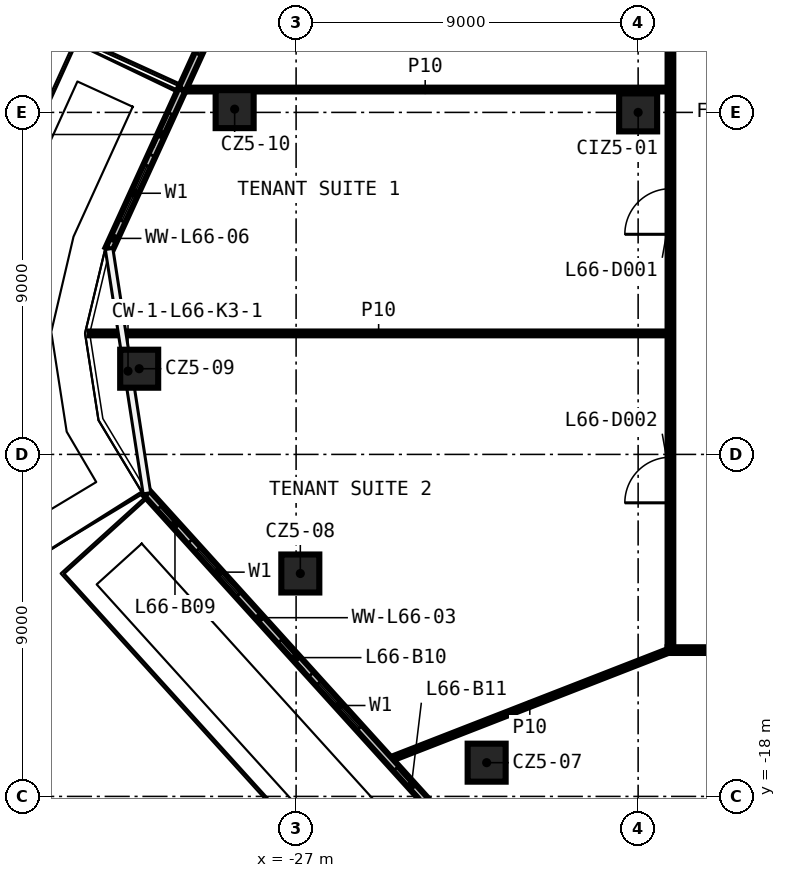
"""IFC4 building model, lengths in metres.
Left out: names, types, materials, properties, quantities, classifications, styles, units other than length and angle.
Written with IfcOpenShell. Run it as: python <this file> out.ifc"""

import sys

from ifc_helpers import new_model, si_unit, direction, frame, frame_2d, origin, origin_2d, place, context, subcontext, project, spatial, rectangle, extrude, element, fill, save


model = new_model("IFC4")
c1 = context("Model", 3, precision=1e-05, world=origin(), true_north=direction((0.0, 1.0)))
c2 = subcontext(c1, "Body", "Model", "MODEL_VIEW")
j1 = project(units=[si_unit("LENGTHUNIT", "METRE"), si_unit("PLANEANGLEUNIT", "RADIAN")], contexts=[c1])
p1 = place(None, origin())
s1 = spatial("IfcSite", under=j1, at=p1, CompositionType="ELEMENT")
p2 = place(p1, origin())
s2 = spatial("IfcBuilding", under=s1, at=p2, CompositionType="ELEMENT")
p3 = place(p2, frame((0.0, 0.0, 311.0)))
s3 = spatial("IfcBuildingStorey", under=s2, at=p3, CompositionType="ELEMENT", Elevation=311.0)
for number, where, z_axis, x_axis in (
    (1, (-21.986, -17.112, 0.0), (0.0, 0.0, 1.0), (1.0, 0.0, 0.0)),
    (2, (-26.889, -12.134, 0.0), (0.0, 0.0, 1.0), (1.0, 0.0, 0.0)),
    (3, (-31.129, -6.745, 0.0), (0.0, 0.0, 1.0), (1.0, 0.0, 0.0)),
    (4, (-28.617, 0.086, 0.0), (0.0, 0.0, 1.0), (1.0, 0.0, 0.0)),
    (5, (-18.0, 0.0, 0.0), (0.0, 0.0, 1.0), (1.0, 0.0, 0.0)),
):
    element("IfcColumn", number, at=place(p3, frame(where, z_axis=z_axis, x_axis=x_axis)), inside=s3, PredefinedType="COLUMN", context=c2, shape_type="SweptSolid", body=[
        extrude(rectangle(XDim=1.0, YDim=1.0, at=origin_2d()), origin(), (0.0, 0.0, 1.0), 3.82),
    ])
p4 = place(p3, frame((17.225, -14.15, 0.0), z_axis=(0.0, 0.0, 1.0), x_axis=(-1.0, 0.0, 0.0)))
e6 = element("IfcWall", 6, at=p4, inside=s3, PredefinedType="PARTITIONING", context=c2, shape_type="SweptSolid", body=[
    extrude(rectangle(XDim=34.45, YDim=0.15, at=frame_2d((17.225, 0.0))), origin(), (0.0, 0.0, 1.0), 3.82),
])
p5 = place(p4, frame((31.269, 0.0, 0.0)))
e7 = element("IfcOpeningElement", 7, at=p5, cuts=e6, PredefinedType="OPENING", context=c2, shape_type="SweptSolid", body=[
    extrude(rectangle(XDim=1.2, YDim=2.1, at=frame_2d((0.6, 1.05))), frame((0.0, 0.085, 0.0), z_axis=(0.0, -1.0, 0.0), x_axis=(1.0, 0.0, 0.0)), (0.0, 0.0, 1.0), 0.17),
])
p6 = place(p4, frame((24.719, 0.0, 0.0)))
e8 = element("IfcOpeningElement", 8, at=p6, cuts=e6, PredefinedType="OPENING", context=c2, shape_type="SweptSolid", body=[
    extrude(rectangle(XDim=1.2, YDim=2.1, at=frame_2d((0.6, 1.05))), frame((0.0, 0.085, 0.0), z_axis=(0.0, -1.0, 0.0), x_axis=(1.0, 0.0, 0.0)), (0.0, 0.0, 1.0), 0.17),
])
p7 = place(p4, frame((20.044, 0.0, 0.0)))
e9 = element("IfcOpeningElement", 9, at=p7, cuts=e6, PredefinedType="OPENING", context=c2, shape_type="SweptSolid", body=[
    extrude(rectangle(XDim=1.2, YDim=2.1, at=frame_2d((0.6, 1.05))), frame((0.0, 0.085, 0.0), z_axis=(0.0, -1.0, 0.0), x_axis=(1.0, 0.0, 0.0)), (0.0, 0.0, 1.0), 0.17),
])
p8 = place(p4, frame((15.364, 0.0, 0.0)))
e10 = element("IfcOpeningElement", 10, at=p8, cuts=e6, PredefinedType="OPENING", context=c2, shape_type="SweptSolid", body=[
    extrude(rectangle(XDim=1.2, YDim=2.1, at=frame_2d((0.6, 1.05))), frame((0.0, 0.085, 0.0), z_axis=(0.0, -1.0, 0.0), x_axis=(1.0, 0.0, 0.0)), (0.0, 0.0, 1.0), 0.17),
])
p9 = place(p4, frame((10.685, 0.0, 0.0)))
e11 = element("IfcOpeningElement", 11, at=p9, cuts=e6, PredefinedType="OPENING", context=c2, shape_type="SweptSolid", body=[
    extrude(rectangle(XDim=1.2, YDim=2.1, at=frame_2d((0.6, 1.05))), frame((0.0, 0.085, 0.0), z_axis=(0.0, -1.0, 0.0), x_axis=(1.0, 0.0, 0.0)), (0.0, 0.0, 1.0), 0.17),
])
p10 = place(p4, frame((4.107, 0.0, 0.0)))
e12 = element("IfcOpeningElement", 12, at=p10, cuts=e6, PredefinedType="OPENING", context=c2, shape_type="SweptSolid", body=[
    extrude(rectangle(XDim=1.2, YDim=2.1, at=frame_2d((0.6, 1.05))), frame((0.0, 0.085, 0.0), z_axis=(0.0, -1.0, 0.0), x_axis=(1.0, 0.0, 0.0)), (0.0, 0.0, 1.0), 0.17),
])
p11 = place(p3, frame((-32.431, -5.816, 0.0), z_axis=(0.0, 0.0, 1.0), x_axis=(1.0, 0.0, 0.0)))
e13 = element("IfcWall", 13, at=p11, inside=s3, PredefinedType="PARTITIONING", context=c2, shape_type="SweptSolid", body=[
    extrude(rectangle(XDim=15.206, YDim=0.1, at=frame_2d((7.603, 0.0))), origin(), (0.0, 0.0, 1.0), 3.82),
])
p12 = place(p3, frame((-29.981, 0.601, 0.0), z_axis=(0.0, 0.0, 1.0), x_axis=(1.0, 0.0, 0.0)))
e14 = element("IfcWall", 14, at=p12, inside=s3, PredefinedType="PARTITIONING", context=c2, shape_type="SweptSolid", body=[
    extrude(rectangle(XDim=12.756, YDim=0.1, at=frame_2d((6.378, 0.0))), origin(), (0.0, 0.0, 1.0), 3.82),
])
p13 = place(p3, frame((-24.55, -17.033, 0.0), z_axis=(0.0, 0.0, 1.0), x_axis=(0.931751191714, 0.363097392911, 0.0)))
e15 = element("IfcWall", 15, at=p13, inside=s3, PredefinedType="PARTITIONING", context=c2, shape_type="SweptSolid", body=[
    extrude(rectangle(XDim=7.942, YDim=0.1, at=frame_2d((3.971, 0.0))), origin(), (0.0, 0.0, 1.0), 3.82),
])
p14 = place(p3, frame((-17.15, -14.075, 0.0), z_axis=(0.0, 0.0, 1.0), x_axis=(0.0, 1.0, 0.0)))
e16 = element("IfcWall", 16, at=p14, inside=s3, PredefinedType="PARTITIONING", context=c2, shape_type="SweptSolid", body=[
    extrude(rectangle(XDim=28.15, YDim=0.15, at=frame_2d((14.075, 0.0))), origin(), (0.0, 0.0, 1.0), 3.82),
])
p15 = place(p14, frame((10.867, 0.0, 0.0)))
e17 = element("IfcOpeningElement", 17, at=p15, cuts=e16, PredefinedType="OPENING", context=c2, shape_type="SweptSolid", body=[
    extrude(rectangle(XDim=1.2, YDim=2.1, at=frame_2d((0.6, 1.05))), frame((0.0, 0.085, 0.0), z_axis=(0.0, -1.0, 0.0), x_axis=(1.0, 0.0, 0.0)), (0.0, 0.0, 1.0), 0.17),
])
p16 = place(p14, frame((3.801, 0.0, 0.0)))
e18 = element("IfcOpeningElement", 18, at=p16, cuts=e16, PredefinedType="OPENING", context=c2, shape_type="SweptSolid", body=[
    extrude(rectangle(XDim=1.2, YDim=2.1, at=frame_2d((0.6, 1.05))), frame((0.0, 0.085, 0.0), z_axis=(0.0, -1.0, 0.0), x_axis=(1.0, 0.0, 0.0)), (0.0, 0.0, 1.0), 0.17),
])
p17 = place(p14, frame((18.279, 0.0, 0.0)))
e19 = element("IfcOpeningElement", 19, at=p17, cuts=e16, PredefinedType="OPENING", context=c2, shape_type="SweptSolid", body=[
    extrude(rectangle(XDim=1.2, YDim=2.1, at=frame_2d((0.6, 1.05))), frame((0.0, 0.085, 0.0), z_axis=(0.0, -1.0, 0.0), x_axis=(1.0, 0.0, 0.0)), (0.0, 0.0, 1.0), 0.17),
])
p18 = place(p3, frame((-22.318, 17.414, 0.0), z_axis=(0.0, 0.0, 1.0), x_axis=(-0.415710447513, -0.909497016943, 0.0)))
e20 = element("IfcWall", 20, at=p18, inside=s3, PredefinedType="SOLIDWALL", context=c2, shape_type="SweptSolid", body=[
    extrude(rectangle(XDim=18.487, YDim=0.2, at=frame_2d((9.243, 0.0))), origin(), (0.0, 0.0, 1.0), 3.82),
])
p19 = place(p18, frame((2.0, 0.0, 0.6)))
e21 = element("IfcOpeningElement", 21, at=p19, cuts=e20, PredefinedType="OPENING", context=c2, shape_type="SweptSolid", body=[
    extrude(rectangle(XDim=1.6, YDim=2.4, at=frame_2d((0.8, 1.2))), frame((0.0, 0.11, 0.0), z_axis=(0.0, -1.0, 0.0), x_axis=(1.0, 0.0, 0.0)), (0.0, 0.0, 1.0), 0.22),
])
p20 = place(p18, frame((0.5, 0.0, 0.0)))
e22 = element("IfcOpeningElement", 22, at=p20, cuts=e20, PredefinedType="OPENING", context=c2, shape_type="SweptSolid", body=[
    extrude(rectangle(XDim=1.2, YDim=2.4, at=frame_2d((0.6, 1.2))), frame((0.0, 0.11, 0.0), z_axis=(0.0, -1.0, 0.0), x_axis=(1.0, 0.0, 0.0)), (0.0, 0.0, 1.0), 0.22),
])
p21 = place(p18, frame((6.622, 0.0, 0.6)))
e23 = element("IfcOpeningElement", 23, at=p21, cuts=e20, PredefinedType="OPENING", context=c2, shape_type="SweptSolid", body=[
    extrude(rectangle(XDim=1.6, YDim=2.4, at=frame_2d((0.8, 1.2))), frame((0.0, 0.11, 0.0), z_axis=(0.0, -1.0, 0.0), x_axis=(1.0, 0.0, 0.0)), (0.0, 0.0, 1.0), 0.22),
])
p22 = place(p18, frame((5.122, 0.0, 0.0)))
e24 = element("IfcOpeningElement", 24, at=p22, cuts=e20, PredefinedType="OPENING", context=c2, shape_type="SweptSolid", body=[
    extrude(rectangle(XDim=1.2, YDim=2.4, at=frame_2d((0.6, 1.2))), frame((0.0, 0.11, 0.0), z_axis=(0.0, -1.0, 0.0), x_axis=(1.0, 0.0, 0.0)), (0.0, 0.0, 1.0), 0.22),
])
p23 = place(p18, frame((9.743, 0.0, 0.6)))
e25 = element("IfcOpeningElement", 25, at=p23, cuts=e20, PredefinedType="OPENING", context=c2, shape_type="SweptSolid", body=[
    extrude(rectangle(XDim=1.6, YDim=2.4, at=frame_2d((0.8, 1.2))), frame((0.0, 0.11, 0.0), z_axis=(0.0, -1.0, 0.0), x_axis=(1.0, 0.0, 0.0)), (0.0, 0.0, 1.0), 0.22),
])
p24 = place(p18, frame((11.643, 0.0, 0.0)))
e26 = element("IfcOpeningElement", 26, at=p24, cuts=e20, PredefinedType="OPENING", context=c2, shape_type="SweptSolid", body=[
    extrude(rectangle(XDim=1.2, YDim=2.4, at=frame_2d((0.6, 1.2))), frame((0.0, 0.11, 0.0), z_axis=(0.0, -1.0, 0.0), x_axis=(1.0, 0.0, 0.0)), (0.0, 0.0, 1.0), 0.22),
])
p25 = place(p18, frame((15.865, 0.0, 0.6)))
e27 = element("IfcOpeningElement", 27, at=p25, cuts=e20, PredefinedType="OPENING", context=c2, shape_type="SweptSolid", body=[
    extrude(rectangle(XDim=1.6, YDim=2.4, at=frame_2d((0.8, 1.2))), frame((0.0, 0.11, 0.0), z_axis=(0.0, -1.0, 0.0), x_axis=(1.0, 0.0, 0.0)), (0.0, 0.0, 1.0), 0.22),
])
p26 = place(p18, frame((14.365, 0.0, 0.0)))
e28 = element("IfcOpeningElement", 28, at=p26, cuts=e20, PredefinedType="OPENING", context=c2, shape_type="SweptSolid", body=[
    extrude(rectangle(XDim=1.2, YDim=2.4, at=frame_2d((0.6, 1.2))), frame((0.0, 0.11, 0.0), z_axis=(0.0, -1.0, 0.0), x_axis=(1.0, 0.0, 0.0)), (0.0, 0.0, 1.0), 0.22),
])
p27 = place(p3, frame((-30.003, 0.601, 0.0), z_axis=(0.0, 0.0, 1.0), x_axis=(-0.415728482872, -0.909488773174, 0.0)))
e29 = element("IfcWall", 29, at=p27, inside=s3, PredefinedType="SOLIDWALL", context=c2, shape_type="SweptSolid", body=[
    extrude(rectangle(XDim=4.612, YDim=0.2, at=frame_2d((2.306, 0.0))), origin(), (0.0, 0.0, 1.0), 3.82),
])
p28 = place(p27, frame((2.2, 0.0, 0.6)))
e30 = element("IfcOpeningElement", 30, at=p28, cuts=e29, PredefinedType="OPENING", context=c2, shape_type="SweptSolid", body=[
    extrude(rectangle(XDim=1.6, YDim=2.4, at=frame_2d((0.8, 1.2))), frame((0.0, 0.11, 0.0), z_axis=(0.0, -1.0, 0.0), x_axis=(1.0, 0.0, 0.0)), (0.0, 0.0, 1.0), 0.22),
])
p29 = place(p27, frame((0.7, 0.0, 0.0)))
e31 = element("IfcOpeningElement", 31, at=p29, cuts=e29, PredefinedType="OPENING", context=c2, shape_type="SweptSolid", body=[
    extrude(rectangle(XDim=1.2, YDim=2.4, at=frame_2d((0.6, 1.2))), frame((0.0, 0.11, 0.0), z_axis=(0.0, -1.0, 0.0), x_axis=(1.0, 0.0, 0.0)), (0.0, 0.0, 1.0), 0.22),
])
p30 = place(p3, frame((-30.926, -10.023, 0.0), z_axis=(0.0, 0.0, 1.0), x_axis=(0.671222052588, -0.74125633631, 0.0)))
e32 = element("IfcWall", 32, at=p30, inside=s3, PredefinedType="SOLIDWALL", context=c2, shape_type="SweptSolid", body=[
    extrude(rectangle(XDim=14.202, YDim=0.2, at=frame_2d((7.101, 0.0))), origin(), (0.0, 0.0, 1.0), 3.82),
])
p31 = place(p30, frame((2.0, 0.0, 0.6)))
e33 = element("IfcOpeningElement", 33, at=p31, cuts=e32, PredefinedType="OPENING", context=c2, shape_type="SweptSolid", body=[
    extrude(rectangle(XDim=1.6, YDim=2.4, at=frame_2d((0.8, 1.2))), frame((0.0, 0.11, 0.0), z_axis=(0.0, -1.0, 0.0), x_axis=(1.0, 0.0, 0.0)), (0.0, 0.0, 1.0), 0.22),
])
p32 = place(p30, frame((0.5, 0.0, 0.0)))
e34 = element("IfcOpeningElement", 34, at=p32, cuts=e32, PredefinedType="OPENING", context=c2, shape_type="SweptSolid", body=[
    extrude(rectangle(XDim=1.2, YDim=2.4, at=frame_2d((0.6, 1.2))), frame((0.0, 0.11, 0.0), z_axis=(0.0, -1.0, 0.0), x_axis=(1.0, 0.0, 0.0)), (0.0, 0.0, 1.0), 0.22),
])
p33 = place(p30, frame((6.734, 0.0, 0.6)))
e35 = element("IfcOpeningElement", 35, at=p33, cuts=e32, PredefinedType="OPENING", context=c2, shape_type="SweptSolid", body=[
    extrude(rectangle(XDim=1.6, YDim=2.4, at=frame_2d((0.8, 1.2))), frame((0.0, 0.11, 0.0), z_axis=(0.0, -1.0, 0.0), x_axis=(1.0, 0.0, 0.0)), (0.0, 0.0, 1.0), 0.22),
])
p34 = place(p30, frame((5.234, 0.0, 0.0)))
e36 = element("IfcOpeningElement", 36, at=p34, cuts=e32, PredefinedType="OPENING", context=c2, shape_type="SweptSolid", body=[
    extrude(rectangle(XDim=1.2, YDim=2.4, at=frame_2d((0.6, 1.2))), frame((0.0, 0.11, 0.0), z_axis=(0.0, -1.0, 0.0), x_axis=(1.0, 0.0, 0.0)), (0.0, 0.0, 1.0), 0.22),
])
p35 = place(p30, frame((11.468, 0.0, 0.6)))
e37 = element("IfcOpeningElement", 37, at=p35, cuts=e32, PredefinedType="OPENING", context=c2, shape_type="SweptSolid", body=[
    extrude(rectangle(XDim=1.6, YDim=2.4, at=frame_2d((0.8, 1.2))), frame((0.0, 0.11, 0.0), z_axis=(0.0, -1.0, 0.0), x_axis=(1.0, 0.0, 0.0)), (0.0, 0.0, 1.0), 0.22),
])
p36 = place(p30, frame((9.768, 0.0, 0.0)))
e38 = element("IfcOpeningElement", 38, at=p36, cuts=e32, PredefinedType="OPENING", context=c2, shape_type="SweptSolid", body=[
    extrude(rectangle(XDim=1.2, YDim=2.4, at=frame_2d((0.6, 1.2))), frame((0.0, 0.11, 0.0), z_axis=(0.0, -1.0, 0.0), x_axis=(1.0, 0.0, 0.0)), (0.0, 0.0, 1.0), 0.22),
])
p37 = place(p15, origin())
e39 = element("IfcDoor", 39, at=p37, inside=s3, OperationType="SINGLE_SWING_RIGHT", PredefinedType="DOOR", context=c2, shape_type="SweptSolid", body=[
    extrude(rectangle(XDim=1.2, YDim=2.1, at=frame_2d((0.6, 1.05))), frame((0.0, 0.025, 0.0), z_axis=(0.0, -1.0, 0.0), x_axis=(1.0, 0.0, 0.0)), (0.0, 0.0, 1.0), 0.05),
])
fill(e17, e39)
p38 = place(p16, origin())
e40 = element("IfcDoor", 40, at=p38, inside=s3, OperationType="SINGLE_SWING_LEFT", PredefinedType="DOOR", context=c2, shape_type="SweptSolid", body=[
    extrude(rectangle(XDim=1.2, YDim=2.1, at=frame_2d((0.6, 1.05))), frame((0.0, 0.025, 0.0), z_axis=(0.0, -1.0, 0.0), x_axis=(1.0, 0.0, 0.0)), (0.0, 0.0, 1.0), 0.05),
])
fill(e18, e40)
p39 = place(p25, origin())
e41 = element("IfcWindow", 41, at=p39, inside=s3, PartitioningType="SINGLE_PANEL", PredefinedType="WINDOW", context=c2, shape_type="SweptSolid", body=[
    extrude(rectangle(XDim=1.6, YDim=2.4, at=frame_2d((0.8, 1.2))), frame((0.0, 0.03, 0.0), z_axis=(0.0, -1.0, 0.0), x_axis=(1.0, 0.0, 0.0)), (0.0, 0.0, 1.0), 0.06),
])
fill(e27, e41)
p40 = place(p28, origin())
e42 = element("IfcWindow", 42, at=p40, inside=s3, PartitioningType="SINGLE_PANEL", PredefinedType="WINDOW", context=c2, shape_type="SweptSolid", body=[
    extrude(rectangle(XDim=1.6, YDim=2.4, at=frame_2d((0.8, 1.2))), frame((0.0, 0.03, 0.0), z_axis=(0.0, -1.0, 0.0), x_axis=(1.0, 0.0, 0.0)), (0.0, 0.0, 1.0), 0.06),
])
fill(e30, e42)
p41 = place(p29, origin())
e43 = element("IfcDoor", 43, at=p41, inside=s3, OperationType="SLIDING_TO_LEFT", PredefinedType="DOOR", context=c2, shape_type="SweptSolid", body=[
    extrude(rectangle(XDim=1.2, YDim=2.4, at=frame_2d((0.6, 1.2))), frame((0.0, 0.025, 0.0), z_axis=(0.0, -1.0, 0.0), x_axis=(1.0, 0.0, 0.0)), (0.0, 0.0, 1.0), 0.05),
])
fill(e31, e43)
p42 = place(p31, origin())
e44 = element("IfcWindow", 44, at=p42, inside=s3, PartitioningType="SINGLE_PANEL", PredefinedType="WINDOW", context=c2, shape_type="SweptSolid", body=[
    extrude(rectangle(XDim=1.6, YDim=2.4, at=frame_2d((0.8, 1.2))), frame((0.0, 0.03, 0.0), z_axis=(0.0, -1.0, 0.0), x_axis=(1.0, 0.0, 0.0)), (0.0, 0.0, 1.0), 0.06),
])
fill(e33, e44)
p43 = place(p32, origin())
e45 = element("IfcDoor", 45, at=p43, inside=s3, OperationType="SLIDING_TO_LEFT", PredefinedType="DOOR", context=c2, shape_type="SweptSolid", body=[
    extrude(rectangle(XDim=1.2, YDim=2.4, at=frame_2d((0.6, 1.2))), frame((0.0, 0.025, 0.0), z_axis=(0.0, -1.0, 0.0), x_axis=(1.0, 0.0, 0.0)), (0.0, 0.0, 1.0), 0.05),
])
fill(e34, e45)
p44 = place(p33, origin())
e46 = element("IfcWindow", 46, at=p44, inside=s3, PartitioningType="SINGLE_PANEL", PredefinedType="WINDOW", context=c2, shape_type="SweptSolid", body=[
    extrude(rectangle(XDim=1.6, YDim=2.4, at=frame_2d((0.8, 1.2))), frame((0.0, 0.03, 0.0), z_axis=(0.0, -1.0, 0.0), x_axis=(1.0, 0.0, 0.0)), (0.0, 0.0, 1.0), 0.06),
])
fill(e35, e46)
p45 = place(p34, origin())
e47 = element("IfcDoor", 47, at=p45, inside=s3, OperationType="SLIDING_TO_LEFT", PredefinedType="DOOR", context=c2, shape_type="SweptSolid", body=[
    extrude(rectangle(XDim=1.2, YDim=2.4, at=frame_2d((0.6, 1.2))), frame((0.0, 0.025, 0.0), z_axis=(0.0, -1.0, 0.0), x_axis=(1.0, 0.0, 0.0)), (0.0, 0.0, 1.0), 0.05),
])
fill(e36, e47)
p46 = place(p36, origin())
e48 = element("IfcDoor", 48, at=p46, inside=s3, OperationType="SLIDING_TO_LEFT", PredefinedType="DOOR", context=c2, shape_type="SweptSolid", body=[
    extrude(rectangle(XDim=1.2, YDim=2.4, at=frame_2d((0.6, 1.2))), frame((0.0, 0.025, 0.0), z_axis=(0.0, -1.0, 0.0), x_axis=(1.0, 0.0, 0.0)), (0.0, 0.0, 1.0), 0.05),
])
fill(e38, e48)
save(model, sys.argv[1])
